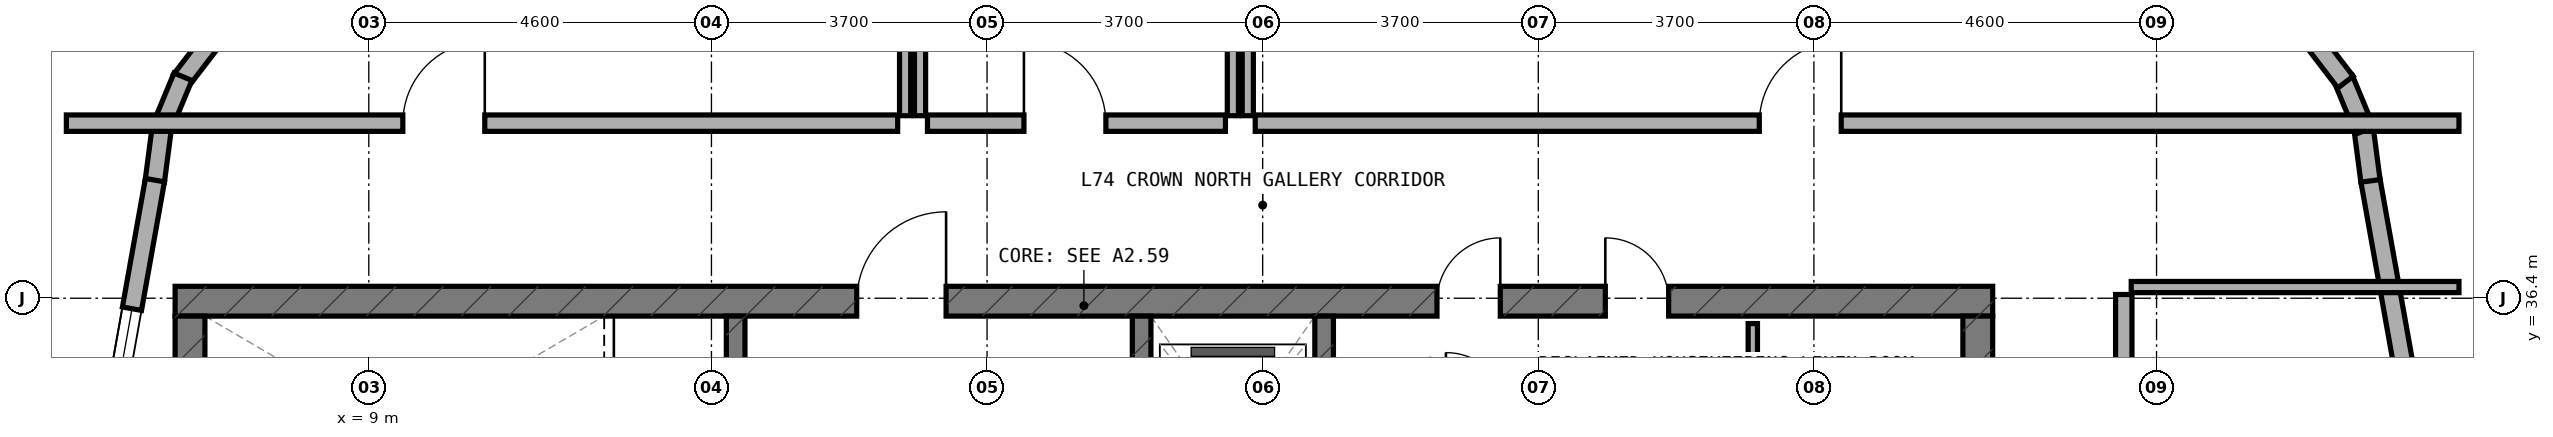
"""IFC4 building model, lengths in metres.
Left out: names, types, materials, properties, quantities, classifications, styles, units other than length and angle.
Written with IfcOpenShell. Run it as: python <this file> out.ifc"""

import sys

from ifc_helpers import new_model, si_unit, direction, frame, frame_2d, origin, place, context, subcontext, project, spatial, rectangle, extrude, element, fill, save


model = new_model("IFC4")
c1 = context("Model", 3, precision=1e-05, world=origin(), true_north=direction((0.0, 1.0)))
c2 = subcontext(c1, "Body", "Model", "MODEL_VIEW")
j1 = project(units=[si_unit("LENGTHUNIT", "METRE"), si_unit("PLANEANGLEUNIT", "RADIAN")], contexts=[c1])
p1 = place(None, origin())
s1 = spatial("IfcSite", under=j1, at=p1, CompositionType="ELEMENT")
p2 = place(p1, origin())
s2 = spatial("IfcBuilding", under=s1, at=p2, CompositionType="ELEMENT")
p3 = place(p2, frame((0.0, 0.0, 272.0)))
s3 = spatial("IfcBuildingStorey", under=s2, at=p3, CompositionType="ELEMENT", Elevation=272.0)
p4 = place(p3, frame((6.4, 36.36, 0.0), z_axis=(0.0, 0.0, 1.0), x_axis=(1.0, 0.0, 0.0)))
e1 = element("IfcWall", 1, at=p4, inside=s3, PredefinedType="SHEAR", context=c2, shape_type="SweptSolid", body=[
    extrude(rectangle(XDim=24.4, YDim=0.4, at=frame_2d((12.2, 0.0))), origin(), (0.0, 0.0, 1.0), 4.56),
])
p5 = place(p4, frame((9.15, 0.0, 0.0)))
e2 = element("IfcOpeningElement", 2, at=p5, cuts=e1, PredefinedType="OPENING", context=c2, shape_type="SweptSolid", body=[
    extrude(rectangle(XDim=1.2, YDim=2.15, at=frame_2d((0.6, 1.075))), frame((0.0, 0.21, 0.0), z_axis=(0.0, -1.0, 0.0), x_axis=(1.0, 0.0, 0.0)), (0.0, 0.0, 1.0), 0.42),
])
p6 = place(p4, frame((19.2, 0.0, 0.0)))
e3 = element("IfcOpeningElement", 3, at=p6, cuts=e1, PredefinedType="OPENING", context=c2, shape_type="SweptSolid", body=[
    extrude(rectangle(XDim=0.85, YDim=2.1, at=frame_2d((0.425, 1.05))), frame((0.0, 0.21, 0.0), z_axis=(0.0, -1.0, 0.0), x_axis=(1.0, 0.0, 0.0)), (0.0, 0.0, 1.0), 0.42),
])
p7 = place(p4, frame((16.94, 0.0, 0.0)))
e4 = element("IfcOpeningElement", 4, at=p7, cuts=e1, PredefinedType="OPENING", context=c2, shape_type="SweptSolid", body=[
    extrude(rectangle(XDim=0.85, YDim=2.1, at=frame_2d((0.425, 1.05))), frame((0.0, 0.21, 0.0), z_axis=(0.0, -1.0, 0.0), x_axis=(1.0, 0.0, 0.0)), (0.0, 0.0, 1.0), 0.42),
])
for number, where, z_axis, x_axis in (
    (5, (6.6, 33.0, 0.0), (0.0, 0.0, 1.0), (0.0, 1.0, 0.0)),
    (6, (30.6, 33.0, 0.0), (0.0, 0.0, 1.0), (0.0, 1.0, 0.0)),
):
    element("IfcWall", number, at=place(p3, frame(where, z_axis=z_axis, x_axis=x_axis)), inside=s3, PredefinedType="SHEAR", context=c2, shape_type="SweptSolid", body=[
        extrude(rectangle(XDim=3.16, YDim=0.4, at=frame_2d((1.58, 0.0))), origin(), (0.0, 0.0, 1.0), 4.56),
    ])
p8 = place(p3, frame((13.925, 33.0, 0.0), z_axis=(0.0, 0.0, 1.0), x_axis=(0.0, 1.0, 0.0)))
e7 = element("IfcWall", 7, at=p8, inside=s3, PredefinedType="STANDARD", context=c2, shape_type="SweptSolid", body=[
    extrude(rectangle(XDim=3.16, YDim=0.25, at=frame_2d((1.58, 0.0))), origin(), (0.0, 0.0, 1.0), 4.52),
])
p9 = place(p8, frame((0.98, 0.0, 0.0)))
e8 = element("IfcOpeningElement", 8, at=p9, cuts=e7, PredefinedType="OPENING", context=c2, shape_type="SweptSolid", body=[
    extrude(rectangle(XDim=1.1, YDim=2.15, at=frame_2d((0.55, 1.075))), frame((0.0, 0.135, 0.0), z_axis=(0.0, -1.0, 0.0), x_axis=(1.0, 0.0, 0.0)), (0.0, 0.0, 1.0), 0.27),
])
p10 = place(p3, frame((19.375, 33.0, 0.0), z_axis=(0.0, 0.0, 1.0), x_axis=(0.0, 1.0, 0.0)))
e9 = element("IfcWall", 9, at=p10, inside=s3, PredefinedType="STANDARD", context=c2, shape_type="SweptSolid", body=[
    extrude(rectangle(XDim=3.16, YDim=0.25, at=frame_2d((1.58, 0.0))), origin(), (0.0, 0.0, 1.0), 4.52),
])
p11 = place(p10, frame((0.98, 0.0, 0.0)))
e10 = element("IfcOpeningElement", 10, at=p11, cuts=e9, PredefinedType="OPENING", context=c2, shape_type="SweptSolid", body=[
    extrude(rectangle(XDim=1.1, YDim=2.15, at=frame_2d((0.55, 1.075))), frame((0.0, 0.135, 0.0), z_axis=(0.0, -1.0, 0.0), x_axis=(1.0, 0.0, 0.0)), (0.0, 0.0, 1.0), 0.27),
])
p12 = place(p3, frame((21.825, 33.0, 0.0), z_axis=(0.0, 0.0, 1.0), x_axis=(0.0, 1.0, 0.0)))
e11 = element("IfcWall", 11, at=p12, inside=s3, PredefinedType="STANDARD", context=c2, shape_type="SweptSolid", body=[
    extrude(rectangle(XDim=3.16, YDim=0.25, at=frame_2d((1.58, 0.0))), origin(), (0.0, 0.0, 1.0), 4.52),
])
p13 = place(p3, frame((37.282, 30.083, 0.0), z_axis=(0.0, 0.0, 1.0), x_axis=(-0.175766426993, 0.984431898682, 0.0)))
e12 = element("IfcWall", 12, at=p13, inside=s3, PredefinedType="STANDARD", context=c2, shape_type="SweptSolid", body=[
    extrude(rectangle(XDim=8.027, YDim=0.26, at=frame_2d((4.014, 0.0))), origin(), (0.0, 0.0, 1.0), 2.74),
])
p14 = place(p13, frame((2.176, 0.0, 0.85)))
e13 = element("IfcOpeningElement", 13, at=p14, cuts=e12, PredefinedType="OPENING", context=c2, shape_type="SweptSolid", body=[
    extrude(rectangle(XDim=2.1, YDim=1.5, at=frame_2d((1.05, 0.75))), frame((0.0, 0.14, 0.0), z_axis=(0.0, -1.0, 0.0), x_axis=(1.0, 0.0, 0.0)), (0.0, 0.0, 1.0), 0.28),
])
p15 = place(p3, frame((35.872, 37.975, 0.0), z_axis=(0.0, 0.0, 1.0), x_axis=(-0.130255288807, 0.991480488834, 0.0)))
e14 = element("IfcWall", 14, at=p15, inside=s3, PredefinedType="STANDARD", context=c2, shape_type="SweptSolid", body=[
    extrude(rectangle(XDim=0.729, YDim=0.26, at=frame_2d((0.365, 0.0))), origin(), (0.0, 0.0, 1.0), 2.74),
])
p16 = place(p3, frame((35.795, 38.652, 0.0), z_axis=(0.0, 0.0, 1.0), x_axis=(-0.383267045233, 0.923637576129, 0.0)))
e15 = element("IfcWall", 15, at=p16, inside=s3, PredefinedType="STANDARD", context=c2, shape_type="SweptSolid", body=[
    extrude(rectangle(XDim=0.746, YDim=0.26, at=frame_2d((0.373, 0.0))), origin(), (0.0, 0.0, 1.0), 2.74),
])
p17 = place(p3, frame((35.537, 39.301, 0.0), z_axis=(0.0, 0.0, 1.0), x_axis=(-0.608603261071, 0.793474681772, 0.0)))
e16 = element("IfcWall", 16, at=p17, inside=s3, PredefinedType="STANDARD", context=c2, shape_type="SweptSolid", body=[
    extrude(rectangle(XDim=0.746, YDim=0.26, at=frame_2d((0.373, 0.0))), origin(), (0.0, 0.0, 1.0), 2.74),
])
for number, where, z_axis, x_axis in (
    (17, (6.938, 39.921, 0.0), (0.0, 0.0, 1.0), (-0.609, -0.793, 0.0)),
    (18, (6.505, 39.373, 0.0), (0.0, 0.0, 1.0), (-0.383, -0.924, 0.0)),
):
    element("IfcWall", number, at=place(p3, frame(where, z_axis=z_axis, x_axis=x_axis)), inside=s3, PredefinedType="STANDARD", context=c2, shape_type="SweptSolid", body=[
        extrude(rectangle(XDim=0.746, YDim=0.26, at=frame_2d((0.373, 0.0))), origin(), (0.0, 0.0, 1.0), 2.74),
    ])
p18 = place(p3, frame((6.227, 38.733, 0.0), z_axis=(0.0, 0.0, 1.0), x_axis=(-0.12969424545, -0.991554034179, 0.0)))
e19 = element("IfcWall", 19, at=p18, inside=s3, PredefinedType="STANDARD", context=c2, shape_type="SweptSolid", body=[
    extrude(rectangle(XDim=0.764, YDim=0.26, at=frame_2d((0.382, 0.0))), origin(), (0.0, 0.0, 1.0), 2.74),
])
p19 = place(p3, frame((6.129, 37.985, 0.0), z_axis=(0.0, 0.0, 1.0), x_axis=(-0.175766426993, -0.984431898682, 0.0)))
e20 = element("IfcWall", 20, at=p19, inside=s3, PredefinedType="STANDARD", context=c2, shape_type="SweptSolid", body=[
    extrude(rectangle(XDim=8.027, YDim=0.26, at=frame_2d((4.014, 0.0))), origin(), (0.0, 0.0, 1.0), 2.74),
])
p20 = place(p19, frame((1.753, 0.0, 0.85)))
e21 = element("IfcOpeningElement", 21, at=p20, cuts=e20, PredefinedType="OPENING", context=c2, shape_type="SweptSolid", body=[
    extrude(rectangle(XDim=2.1, YDim=1.5, at=frame_2d((1.05, 0.75))), frame((0.0, 0.14, 0.0), z_axis=(0.0, -1.0, 0.0), x_axis=(1.0, 0.0, 0.0)), (0.0, 0.0, 1.0), 0.28),
])
p21 = place(p19, frame((6.18, 0.0, 0.85)))
e22 = element("IfcOpeningElement", 22, at=p21, cuts=e20, PredefinedType="OPENING", context=c2, shape_type="SweptSolid", body=[
    extrude(rectangle(XDim=1.5, YDim=1.5, at=frame_2d((0.75, 0.75))), frame((0.0, 0.14, 0.0), z_axis=(0.0, -1.0, 0.0), x_axis=(1.0, 0.0, 0.0)), (0.0, 0.0, 1.0), 0.28),
])
p22 = place(p3, frame((27.58, 33.1, 0.0), z_axis=(0.0, 0.0, 1.0), x_axis=(0.0, 1.0, 0.0)))
e23 = element("IfcWall", 23, at=p22, inside=s3, PredefinedType="PARTITIONING", context=c2, shape_type="SweptSolid", body=[
    extrude(rectangle(XDim=2.96, YDim=0.125, at=frame_2d((1.48, 0.0))), origin(), (0.0, 0.0, 1.0), 2.72),
])
p23 = place(p22, frame((1.055, 0.0, 0.0)))
e24 = element("IfcOpeningElement", 24, at=p23, cuts=e23, PredefinedType="OPENING", context=c2, shape_type="SweptSolid", body=[
    extrude(rectangle(XDim=0.85, YDim=2.1, at=frame_2d((0.425, 1.05))), frame((0.0, 0.073, 0.0), z_axis=(0.0, -1.0, 0.0), x_axis=(1.0, 0.0, 0.0)), (0.0, 0.0, 1.0), 0.145),
])
p24 = place(p3, frame((32.66, 36.55, 0.0), z_axis=(0.0, 0.0, 1.0), x_axis=(1.0, 0.0, 0.0)))
e25 = element("IfcWall", 25, at=p24, inside=s3, PredefinedType="PARTITIONING", context=c2, shape_type="SweptSolid", body=[
    extrude(rectangle(XDim=4.4, YDim=0.15, at=frame_2d((2.2, 0.0))), origin(), (0.0, 0.0, 1.0), 2.72),
])
p25 = place(p3, frame((32.56, 13.55, 0.0), z_axis=(0.0, 0.0, 1.0), x_axis=(0.0, 1.0, 0.0)))
e26 = element("IfcWall", 26, at=p25, inside=s3, PredefinedType="SOLIDWALL", context=c2, shape_type="SweptSolid", body=[
    extrude(rectangle(XDim=22.9, YDim=0.22, at=frame_2d((11.45, 0.0))), origin(), (0.0, 0.0, 1.0), 2.72),
])
p26 = place(p25, frame((9.8, 0.0, 0.0)))
e27 = element("IfcOpeningElement", 27, at=p26, cuts=e26, PredefinedType="OPENING", context=c2, shape_type="SweptSolid", body=[
    extrude(rectangle(XDim=1.1, YDim=2.1, at=frame_2d((0.55, 1.05))), frame((0.0, 0.12, 0.0), z_axis=(0.0, -1.0, 0.0), x_axis=(1.0, 0.0, 0.0)), (0.0, 0.0, 1.0), 0.24),
])
p27 = place(p3, frame((16.2, 38.85, 0.0), z_axis=(0.0, 0.0, 1.0), x_axis=(0.0, 1.0, 0.0)))
e28 = element("IfcWall", 28, at=p27, inside=s3, PredefinedType="PARTITIONING", context=c2, shape_type="SweptSolid", body=[
    extrude(rectangle(XDim=3.01, YDim=0.15, at=frame_2d((1.505, 0.0))), origin(), (0.0, 0.0, 1.0), 2.72),
])
p28 = place(p3, frame((4.94, 38.75, 0.0), z_axis=(0.0, 0.0, 1.0), x_axis=(1.0, 0.0, 0.0)))
e29 = element("IfcWall", 29, at=p28, inside=s3, PredefinedType="SOLIDWALL", context=c2, shape_type="SweptSolid", body=[
    extrude(rectangle(XDim=11.16, YDim=0.22, at=frame_2d((5.58, 0.0))), origin(), (0.0, 0.0, 1.0), 2.72),
])
p29 = place(p28, frame((4.517, 0.0, 0.0)))
e30 = element("IfcOpeningElement", 30, at=p29, cuts=e29, PredefinedType="OPENING", context=c2, shape_type="SweptSolid", body=[
    extrude(rectangle(XDim=1.1, YDim=2.1, at=frame_2d((0.55, 1.05))), frame((0.0, 0.12, 0.0), z_axis=(0.0, -1.0, 0.0), x_axis=(1.0, 0.0, 0.0)), (0.0, 0.0, 1.0), 0.24),
])
for number, where, z_axis, x_axis in (
    (31, (16.4, 38.85, 0.0), (0.0, 0.0, 1.0), (0.0, 1.0, 0.0)),
    (32, (20.6, 38.85, 0.0), (0.0, 0.0, 1.0), (0.0, 1.0, 0.0)),
):
    element("IfcWall", number, at=place(p3, frame(where, z_axis=z_axis, x_axis=x_axis)), inside=s3, PredefinedType="PARTITIONING", context=c2, shape_type="SweptSolid", body=[
        extrude(rectangle(XDim=3.01, YDim=0.15, at=frame_2d((1.505, 0.0))), origin(), (0.0, 0.0, 1.0), 2.72),
    ])
p30 = place(p3, frame((16.5, 38.75, 0.0), z_axis=(0.0, 0.0, 1.0), x_axis=(1.0, 0.0, 0.0)))
e33 = element("IfcWall", 33, at=p30, inside=s3, PredefinedType="SOLIDWALL", context=c2, shape_type="SweptSolid", body=[
    extrude(rectangle(XDim=4.0, YDim=0.22, at=frame_2d((2.0, 0.0))), origin(), (0.0, 0.0, 1.0), 2.72),
])
p31 = place(p30, frame((1.295, 0.0, 0.0)))
e34 = element("IfcOpeningElement", 34, at=p31, cuts=e33, PredefinedType="OPENING", context=c2, shape_type="SweptSolid", body=[
    extrude(rectangle(XDim=1.1, YDim=2.1, at=frame_2d((0.55, 1.05))), frame((0.0, 0.12, 0.0), z_axis=(0.0, -1.0, 0.0), x_axis=(1.0, 0.0, 0.0)), (0.0, 0.0, 1.0), 0.24),
])
p32 = place(p3, frame((20.8, 38.85, 0.0), z_axis=(0.0, 0.0, 1.0), x_axis=(0.0, 1.0, 0.0)))
e35 = element("IfcWall", 35, at=p32, inside=s3, PredefinedType="PARTITIONING", context=c2, shape_type="SweptSolid", body=[
    extrude(rectangle(XDim=3.01, YDim=0.15, at=frame_2d((1.505, 0.0))), origin(), (0.0, 0.0, 1.0), 2.72),
])
p33 = place(p3, frame((20.9, 38.75, 0.0), z_axis=(0.0, 0.0, 1.0), x_axis=(1.0, 0.0, 0.0)))
e36 = element("IfcWall", 36, at=p33, inside=s3, PredefinedType="SOLIDWALL", context=c2, shape_type="SweptSolid", body=[
    extrude(rectangle(XDim=16.16, YDim=0.22, at=frame_2d((8.08, 0.0))), origin(), (0.0, 0.0, 1.0), 2.72),
])
p34 = place(p33, frame((6.767, 0.0, 0.0)))
e37 = element("IfcOpeningElement", 37, at=p34, cuts=e36, PredefinedType="OPENING", context=c2, shape_type="SweptSolid", body=[
    extrude(rectangle(XDim=1.1, YDim=2.1, at=frame_2d((0.55, 1.05))), frame((0.0, 0.12, 0.0), z_axis=(0.0, -1.0, 0.0), x_axis=(1.0, 0.0, 0.0)), (0.0, 0.0, 1.0), 0.24),
])
p35 = place(p20, origin())
e38 = element("IfcWindow", 38, at=p35, inside=s3, PartitioningType="SINGLE_PANEL", PredefinedType="WINDOW", context=c2, shape_type="SweptSolid", body=[
    extrude(rectangle(XDim=2.1, YDim=1.5, at=frame_2d((1.05, 0.75))), frame((0.0, 0.03, 0.0), z_axis=(0.0, -1.0, 0.0), x_axis=(1.0, 0.0, 0.0)), (0.0, 0.0, 1.0), 0.06),
])
fill(e21, e38)
p36 = place(p5, origin())
e39 = element("IfcDoor", 39, at=p36, inside=s3, OperationType="SINGLE_SWING_RIGHT", PredefinedType="DOOR", context=c2, shape_type="SweptSolid", body=[
    extrude(rectangle(XDim=1.2, YDim=2.15, at=frame_2d((0.6, 1.075))), frame((0.0, 0.025, 0.0), z_axis=(0.0, -1.0, 0.0), x_axis=(1.0, 0.0, 0.0)), (0.0, 0.0, 1.0), 0.05),
])
fill(e2, e39)
p37 = place(p6, origin())
e40 = element("IfcDoor", 40, at=p37, inside=s3, OperationType="SINGLE_SWING_LEFT", PredefinedType="DOOR", context=c2, shape_type="SweptSolid", body=[
    extrude(rectangle(XDim=0.85, YDim=2.1, at=frame_2d((0.425, 1.05))), frame((0.0, 0.025, 0.0), z_axis=(0.0, -1.0, 0.0), x_axis=(1.0, 0.0, 0.0)), (0.0, 0.0, 1.0), 0.05),
])
fill(e3, e40)
p38 = place(p7, origin())
e41 = element("IfcDoor", 41, at=p38, inside=s3, OperationType="SINGLE_SWING_RIGHT", PredefinedType="DOOR", context=c2, shape_type="SweptSolid", body=[
    extrude(rectangle(XDim=0.85, YDim=2.1, at=frame_2d((0.425, 1.05))), frame((0.0, 0.025, 0.0), z_axis=(0.0, -1.0, 0.0), x_axis=(1.0, 0.0, 0.0)), (0.0, 0.0, 1.0), 0.05),
])
fill(e4, e41)
p39 = place(p29, origin())
e42 = element("IfcDoor", 42, at=p39, inside=s3, OperationType="SINGLE_SWING_RIGHT", PredefinedType="DOOR", context=c2, shape_type="SweptSolid", body=[
    extrude(rectangle(XDim=1.1, YDim=2.1, at=frame_2d((0.55, 1.05))), frame((0.0, 0.025, 0.0), z_axis=(0.0, -1.0, 0.0), x_axis=(1.0, 0.0, 0.0)), (0.0, 0.0, 1.0), 0.05),
])
fill(e30, e42)
p40 = place(p31, origin())
e43 = element("IfcDoor", 43, at=p40, inside=s3, OperationType="SINGLE_SWING_LEFT", PredefinedType="DOOR", context=c2, shape_type="SweptSolid", body=[
    extrude(rectangle(XDim=1.1, YDim=2.1, at=frame_2d((0.55, 1.05))), frame((0.0, 0.025, 0.0), z_axis=(0.0, -1.0, 0.0), x_axis=(1.0, 0.0, 0.0)), (0.0, 0.0, 1.0), 0.05),
])
fill(e34, e43)
p41 = place(p34, origin())
e44 = element("IfcDoor", 44, at=p41, inside=s3, OperationType="SINGLE_SWING_RIGHT", PredefinedType="DOOR", context=c2, shape_type="SweptSolid", body=[
    extrude(rectangle(XDim=1.1, YDim=2.1, at=frame_2d((0.55, 1.05))), frame((0.0, 0.025, 0.0), z_axis=(0.0, -1.0, 0.0), x_axis=(1.0, 0.0, 0.0)), (0.0, 0.0, 1.0), 0.05),
])
fill(e37, e44)
save(model, sys.argv[1])
